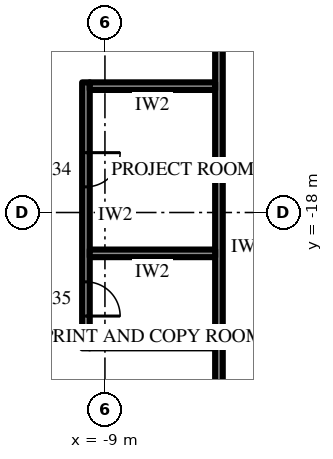
"""IFC4 building model, lengths in metres.
Left out: names, types, materials, properties, quantities, classifications, styles, units other than length and angle.
Written with IfcOpenShell. Run it as: python <this file> out.ifc"""

import sys

from ifc_helpers import new_model, si_unit, direction, frame, frame_2d, origin, place, context, subcontext, project, spatial, rectangle, extrude, element, fill, save


model = new_model("IFC4")
c1 = context("Model", 3, precision=1e-05, world=origin(), true_north=direction((0.0, 1.0)))
c2 = subcontext(c1, "Body", "Model", "MODEL_VIEW")
j1 = project(units=[si_unit("LENGTHUNIT", "METRE"), si_unit("PLANEANGLEUNIT", "RADIAN")], contexts=[c1])
p1 = place(None, origin())
s1 = spatial("IfcSite", under=j1, at=p1, CompositionType="ELEMENT")
p2 = place(p1, origin())
s2 = spatial("IfcBuilding", under=s1, at=p2, CompositionType="ELEMENT")
p3 = place(p2, frame((0.0, 0.0, 291.1)))
s3 = spatial("IfcBuildingStorey", under=s2, at=p3, CompositionType="ELEMENT", Elevation=291.1)
p4 = place(p3, frame((-6.0, -12.3, 0.0), z_axis=(0.0, 0.0, 1.0), x_axis=(0.0, -1.0, 0.0)))
e1 = element("IfcWall", 1, at=p4, inside=s3, PredefinedType="PARTITIONING", context=c2, shape_type="SweptSolid", body=[
    extrude(rectangle(XDim=16.5, YDim=0.2, at=frame_2d((8.25, 0.0))), origin(), (0.0, 0.0, 1.0), 4.0),
])
p5 = place(p3, frame((-9.5, -14.575, 0.0), z_axis=(0.0, 0.0, 1.0), x_axis=(0.0, -1.0, 0.0)))
e2 = element("IfcWall", 2, at=p5, inside=s3, PredefinedType="PARTITIONING", context=c2, shape_type="SweptSolid", body=[
    extrude(rectangle(XDim=7.0, YDim=0.2, at=frame_2d((3.5, 0.0))), origin(), (0.0, 0.0, 1.0), 4.0),
])
p6 = place(p5, frame((1.85, 0.0, 0.0)))
e3 = element("IfcOpeningElement", 3, at=p6, cuts=e2, PredefinedType="OPENING", context=c2, shape_type="SweptSolid", body=[
    extrude(rectangle(XDim=0.9, YDim=2.2, at=frame_2d((0.45, 1.1))), frame((0.0, 0.11, 0.0), z_axis=(0.0, -1.0, 0.0), x_axis=(1.0, 0.0, 0.0)), (0.0, 0.0, 1.0), 0.22),
])
p7 = place(p5, frame((5.25, 0.0, 0.0)))
e4 = element("IfcOpeningElement", 4, at=p7, cuts=e2, PredefinedType="OPENING", context=c2, shape_type="SweptSolid", body=[
    extrude(rectangle(XDim=0.9, YDim=2.2, at=frame_2d((0.45, 1.1))), frame((0.0, 0.11, 0.0), z_axis=(0.0, -1.0, 0.0), x_axis=(1.0, 0.0, 0.0)), (0.0, 0.0, 1.0), 0.22),
])
for number, where, z_axis, x_axis in (
    (5, (-6.1, -14.675, 0.0), (0.0, 0.0, 1.0), (-1.0, 0.0, 0.0)),
    (6, (-6.1, -19.075, 0.0), (0.0, 0.0, 1.0), (-1.0, 0.0, 0.0)),
    (7, (-6.1, -21.475, 0.0), (0.0, 0.0, 1.0), (-1.0, 0.0, 0.0)),
):
    element("IfcWall", number, at=place(p3, frame(where, z_axis=z_axis, x_axis=x_axis)), inside=s3, PredefinedType="PARTITIONING", context=c2, shape_type="SweptSolid", body=[
        extrude(rectangle(XDim=3.3, YDim=0.2, at=frame_2d((1.65, 0.0))), origin(), (0.0, 0.0, 1.0), 4.0),
    ])
p8 = place(p6, origin())
e8 = element("IfcDoor", 8, at=p8, inside=s3, OperationType="SINGLE_SWING_RIGHT", PredefinedType="DOOR", context=c2, shape_type="SweptSolid", body=[
    extrude(rectangle(XDim=0.9, YDim=2.2, at=frame_2d((0.45, 1.1))), frame((0.0, 0.025, 0.0), z_axis=(0.0, -1.0, 0.0), x_axis=(1.0, 0.0, 0.0)), (0.0, 0.0, 1.0), 0.05),
])
fill(e3, e8)
p9 = place(p7, origin())
e9 = element("IfcDoor", 9, at=p9, inside=s3, OperationType="SINGLE_SWING_LEFT", PredefinedType="DOOR", context=c2, shape_type="SweptSolid", body=[
    extrude(rectangle(XDim=0.9, YDim=2.2, at=frame_2d((0.45, 1.1))), frame((0.0, 0.025, 0.0), z_axis=(0.0, -1.0, 0.0), x_axis=(1.0, 0.0, 0.0)), (0.0, 0.0, 1.0), 0.05),
])
fill(e4, e9)
save(model, sys.argv[1])
